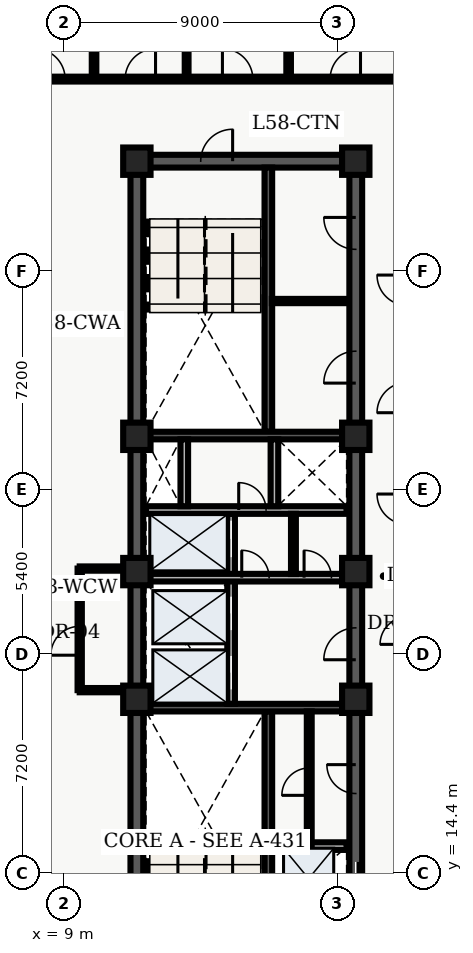
"""IFC4 building model, lengths in metres.
Left out: names, types, materials, properties, quantities, classifications, styles, units other than length and angle.
Written with IfcOpenShell. Run it as: python <this file> out.ifc"""

import sys

from ifc_helpers import new_model, entity, si_unit, converted_unit, direction, frame, origin_with_axes, origin_2d_with_axis, place, context, subcontext, project, spatial, polyline, rectangle, outline, extrude, element, fill, save


model = new_model("IFC4")
c1 = context("Model", 3, precision=1e-05, world=origin_with_axes(), true_north=direction((0.0, 1.0)))
c2 = subcontext(c1, "Body", "Model", "MODEL_VIEW")
j1 = project(units=[si_unit("LENGTHUNIT", "METRE"), converted_unit("PLANEANGLEUNIT", "DEGREE", entity("IfcPlaneAngleMeasure", 0.017), si_unit("PLANEANGLEUNIT", "RADIAN"), dimensions=[0, 0, 0, 0, 0, 0, 0])], contexts=[c1])
p1 = place(None, origin_with_axes())
s1 = spatial("IfcSite", under=j1, at=p1, CompositionType="ELEMENT")
p2 = place(p1, origin_with_axes())
s2 = spatial("IfcBuilding", under=s1, at=p2, CompositionType="ELEMENT")
p3 = place(p2, frame((0.0, 0.0, 236.4), z_axis=(0.0, 0.0, 1.0), x_axis=(1.0, 0.0, 0.0)))
s3 = spatial("IfcBuildingStorey", under=s2, at=p3, CompositionType="ELEMENT", Elevation=236.4)
p4 = place(p3, frame((11.4, 10.8, 0.0), z_axis=(0.0, 0.0, 1.0), x_axis=(0.0, 1.0, 0.0)))
e1 = element("IfcWall", 1, at=p4, inside=s3, PredefinedType="SHEAR", context=c2, shape_type="SweptSolid", body=[
    extrude(outline(polyline([(0.0, -0.21), (27.0, -0.21), (27.0, 0.21), (0.0, 0.21), (0.0, -0.21)])), origin_with_axes(), (0.0, 0.0, 1.0), 3.66),
])
p5 = place(p3, frame((11.4, 37.8, 0.0), z_axis=(0.0, 0.0, 1.0), x_axis=(1.0, 0.0, 0.0)))
e2 = element("IfcWall", 2, at=p5, inside=s3, PredefinedType="SHEAR", context=c2, shape_type="SweptSolid", body=[
    extrude(outline(polyline([(0.0, -0.21), (7.2, -0.21), (7.2, 0.21), (0.0, 0.21), (0.0, -0.21)])), origin_with_axes(), (0.0, 0.0, 1.0), 3.66),
])
p6 = place(p5, frame((2.625, 0.0, 0.0), z_axis=(0.0, 0.0, 1.0), x_axis=(1.0, 0.0, 0.0)))
e3 = element("IfcOpeningElement", 3, at=p6, cuts=e2, PredefinedType="OPENING", context=c2, shape_type="SweptSolid", body=[
    extrude(rectangle(XDim=1.05, YDim=0.44, at=origin_2d_with_axis()), origin_with_axes(), (0.0, 0.0, 1.0), 2.15),
])
p7 = place(p3, frame((18.6, 10.8, 0.0), z_axis=(0.0, 0.0, 1.0), x_axis=(0.0, 1.0, 0.0)))
e4 = element("IfcWall", 4, at=p7, inside=s3, PredefinedType="SHEAR", context=c2, shape_type="SweptSolid", body=[
    extrude(outline(polyline([(0.0, -0.21), (13.5, -0.21), (13.5, 0.21), (0.0, 0.21), (0.0, -0.21)])), origin_with_axes(), (0.0, 0.0, 1.0), 3.66),
])
p8 = place(p7, frame((1.3, 0.0, 0.0), z_axis=(0.0, 0.0, 1.0), x_axis=(1.0, 0.0, 0.0)))
e5 = element("IfcOpeningElement", 5, at=p8, cuts=e4, PredefinedType="OPENING", context=c2, shape_type="SweptSolid", body=[
    extrude(rectangle(XDim=1.1, YDim=0.44, at=origin_2d_with_axis()), origin_with_axes(), (0.0, 0.0, 1.0), 2.15),
])
p9 = place(p7, frame((3.4, 0.0, 0.0), z_axis=(0.0, 0.0, 1.0), x_axis=(1.0, 0.0, 0.0)))
e6 = element("IfcOpeningElement", 6, at=p9, cuts=e4, PredefinedType="OPENING", context=c2, shape_type="SweptSolid", body=[
    extrude(rectangle(XDim=1.1, YDim=0.44, at=origin_2d_with_axis()), origin_with_axes(), (0.0, 0.0, 1.0), 2.15),
])
p10 = place(p7, frame((11.125, 0.0, 0.0), z_axis=(0.0, 0.0, 1.0), x_axis=(1.0, 0.0, 0.0)))
e7 = element("IfcOpeningElement", 7, at=p10, cuts=e4, PredefinedType="OPENING", context=c2, shape_type="SweptSolid", body=[
    extrude(rectangle(XDim=1.05, YDim=0.44, at=origin_2d_with_axis()), origin_with_axes(), (0.0, 0.0, 1.0), 2.15),
])
p11 = place(p7, frame((6.675, 0.0, 0.0), z_axis=(0.0, 0.0, 1.0), x_axis=(1.0, 0.0, 0.0)))
e8 = element("IfcOpeningElement", 8, at=p11, cuts=e4, PredefinedType="OPENING", context=c2, shape_type="SweptSolid", body=[
    extrude(rectangle(XDim=0.95, YDim=0.44, at=origin_2d_with_axis()), origin_with_axes(), (0.0, 0.0, 1.0), 2.15),
])
p12 = place(p3, frame((18.6, 24.3, 0.0), z_axis=(0.0, 0.0, 1.0), x_axis=(0.0, 1.0, 0.0)))
e9 = element("IfcWall", 9, at=p12, inside=s3, PredefinedType="SHEAR", context=c2, shape_type="SweptSolid", body=[
    extrude(outline(polyline([(0.0, -0.21), (13.5, -0.21), (13.5, 0.21), (0.0, 0.21), (0.0, -0.21)])), origin_with_axes(), (0.0, 0.0, 1.0), 3.66),
])
p13 = place(p12, frame((6.725, 0.0, 0.0), z_axis=(0.0, 0.0, 1.0), x_axis=(1.0, 0.0, 0.0)))
e10 = element("IfcOpeningElement", 10, at=p13, cuts=e9, PredefinedType="OPENING", context=c2, shape_type="SweptSolid", body=[
    extrude(rectangle(XDim=1.05, YDim=0.44, at=origin_2d_with_axis()), origin_with_axes(), (0.0, 0.0, 1.0), 2.15),
])
p14 = place(p12, frame((11.125, 0.0, 0.0), z_axis=(0.0, 0.0, 1.0), x_axis=(1.0, 0.0, 0.0)))
e11 = element("IfcOpeningElement", 11, at=p14, cuts=e9, PredefinedType="OPENING", context=c2, shape_type="SweptSolid", body=[
    extrude(rectangle(XDim=1.05, YDim=0.44, at=origin_2d_with_axis()), origin_with_axes(), (0.0, 0.0, 1.0), 2.15),
])
p15 = place(p3, frame((15.725, 11.01, 0.0), z_axis=(0.0, 0.0, 1.0), x_axis=(0.0, 1.0, 0.0)))
e12 = element("IfcWall", 12, at=p15, inside=s3, PredefinedType="SHEAR", context=c2, shape_type="SweptSolid", body=[
    extrude(outline(polyline([(0.0, -0.125), (8.69, -0.125), (8.69, 0.125), (0.0, 0.125), (0.0, -0.125)])), origin_with_axes(), (0.0, 0.0, 1.0), 3.66),
])
p16 = place(p3, frame((11.61, 19.825, 0.0), z_axis=(0.0, 0.0, 1.0), x_axis=(1.0, 0.0, 0.0)))
e13 = element("IfcWall", 13, at=p16, inside=s3, PredefinedType="SHEAR", context=c2, shape_type="SweptSolid", body=[
    extrude(outline(polyline([(0.0, -0.125), (6.78, -0.125), (6.78, 0.125), (0.0, 0.125), (0.0, -0.125)])), origin_with_axes(), (0.0, 0.0, 1.0), 3.66),
])
p17 = place(p3, frame((15.725, 28.9, 0.0), z_axis=(0.0, 0.0, 1.0), x_axis=(0.0, 1.0, 0.0)))
e14 = element("IfcWall", 14, at=p17, inside=s3, PredefinedType="SHEAR", context=c2, shape_type="SweptSolid", body=[
    extrude(outline(polyline([(0.0, -0.125), (8.69, -0.125), (8.69, 0.125), (0.0, 0.125), (0.0, -0.125)])), origin_with_axes(), (0.0, 0.0, 1.0), 3.66),
])
p18 = place(p3, frame((11.61, 28.775, 0.0), z_axis=(0.0, 0.0, 1.0), x_axis=(1.0, 0.0, 0.0)))
e15 = element("IfcWall", 15, at=p18, inside=s3, PredefinedType="SHEAR", context=c2, shape_type="SweptSolid", body=[
    extrude(outline(polyline([(0.0, -0.125), (6.78, -0.125), (6.78, 0.125), (0.0, 0.125), (0.0, -0.125)])), origin_with_axes(), (0.0, 0.0, 1.0), 3.66),
])
p19 = place(p3, frame((14.5, 19.95, 0.0), z_axis=(0.0, 0.0, 1.0), x_axis=(0.0, 1.0, 0.0)))
e16 = element("IfcWall", 16, at=p19, inside=s3, PredefinedType="SOLIDWALL", context=c2, shape_type="SweptSolid", body=[
    extrude(outline(polyline([(0.0, -0.125), (6.25, -0.125), (6.25, 0.125), (0.0, 0.125), (0.0, -0.125)])), origin_with_axes(), (0.0, 0.0, 1.0), 2.7),
])
p20 = place(p19, frame((1.025, 0.0, 0.0), z_axis=(0.0, 0.0, 1.0), x_axis=(1.0, 0.0, 0.0)))
e17 = element("IfcOpeningElement", 17, at=p20, cuts=e16, PredefinedType="OPENING", context=c2, shape_type="SweptSolid", body=[
    extrude(rectangle(XDim=1.1, YDim=0.27, at=origin_2d_with_axis()), origin_with_axes(), (0.0, 0.0, 1.0), 2.15),
])
p21 = place(p19, frame((2.975, 0.0, 0.0), z_axis=(0.0, 0.0, 1.0), x_axis=(1.0, 0.0, 0.0)))
e18 = element("IfcOpeningElement", 18, at=p21, cuts=e16, PredefinedType="OPENING", context=c2, shape_type="SweptSolid", body=[
    extrude(rectangle(XDim=1.1, YDim=0.27, at=origin_2d_with_axis()), origin_with_axes(), (0.0, 0.0, 1.0), 2.15),
])
p22 = place(p19, frame((5.425, 0.0, 0.0), z_axis=(0.0, 0.0, 1.0), x_axis=(1.0, 0.0, 0.0)))
e19 = element("IfcOpeningElement", 19, at=p22, cuts=e16, PredefinedType="OPENING", context=c2, shape_type="SweptSolid", body=[
    extrude(rectangle(XDim=1.2, YDim=0.27, at=origin_2d_with_axis()), origin_with_axes(), (0.0, 0.0, 1.0), 2.15),
])
p23 = place(p3, frame((11.7, 24.1, 0.0), z_axis=(0.0, 0.0, 1.0), x_axis=(1.0, 0.0, 0.0)))
e20 = element("IfcWall", 20, at=p23, inside=s3, PredefinedType="SOLIDWALL", context=c2, shape_type="SweptSolid", body=[
    extrude(outline(polyline([(0.0, -0.125), (6.6, -0.125), (6.6, 0.125), (0.0, 0.125), (0.0, -0.125)])), origin_with_axes(), (0.0, 0.0, 1.0), 2.7),
])
p24 = place(p23, frame((3.6, 0.0, 0.0), z_axis=(0.0, 0.0, 1.0), x_axis=(1.0, 0.0, 0.0)))
e21 = element("IfcOpeningElement", 21, at=p24, cuts=e20, PredefinedType="OPENING", context=c2, shape_type="SweptSolid", body=[
    extrude(rectangle(XDim=0.9, YDim=0.27, at=origin_2d_with_axis()), origin_with_axes(), (0.0, 0.0, 1.0), 2.15),
])
p25 = place(p23, frame((5.65, 0.0, 0.0), z_axis=(0.0, 0.0, 1.0), x_axis=(1.0, 0.0, 0.0)))
e22 = element("IfcOpeningElement", 22, at=p25, cuts=e20, PredefinedType="OPENING", context=c2, shape_type="SweptSolid", body=[
    extrude(rectangle(XDim=0.9, YDim=0.27, at=origin_2d_with_axis()), origin_with_axes(), (0.0, 0.0, 1.0), 2.15),
])
p26 = place(p3, frame((11.7, 26.325, 0.0), z_axis=(0.0, 0.0, 1.0), x_axis=(1.0, 0.0, 0.0)))
e23 = element("IfcWall", 23, at=p26, inside=s3, PredefinedType="SOLIDWALL", context=c2, shape_type="SweptSolid", body=[
    extrude(outline(polyline([(0.0, -0.125), (6.6, -0.125), (6.6, 0.125), (0.0, 0.125), (0.0, -0.125)])), origin_with_axes(), (0.0, 0.0, 1.0), 2.7),
])
p27 = place(p26, frame((3.5, 0.0, 0.0), z_axis=(0.0, 0.0, 1.0), x_axis=(1.0, 0.0, 0.0)))
e24 = element("IfcOpeningElement", 24, at=p27, cuts=e23, PredefinedType="OPENING", context=c2, shape_type="SweptSolid", body=[
    extrude(rectangle(XDim=0.9, YDim=0.27, at=origin_2d_with_axis()), origin_with_axes(), (0.0, 0.0, 1.0), 2.15),
])
for number, where, z_axis, x_axis in (
    (25, (12.96, 26.45, 0.0), (0.0, 0.0, 1.0), (0.0, 1.0, 0.0)),
    (26, (15.925, 26.45, 0.0), (0.0, 0.0, 1.0), (0.0, 1.0, 0.0)),
):
    element("IfcWall", number, at=place(p3, frame(where, z_axis=z_axis, x_axis=x_axis)), inside=s3, PredefinedType="SOLIDWALL", context=c2, shape_type="SweptSolid", body=[
        extrude(outline(polyline([(0.0, -0.125), (2.2, -0.125), (2.2, 0.125), (0.0, 0.125), (0.0, -0.125)])), origin_with_axes(), (0.0, 0.0, 1.0), 2.7),
    ])
for number, where, z_axis, x_axis in (
    (27, (11.4, 20.1, 0.0), (0.0, 0.0, 1.0), (1.0, 0.0, 0.0)),
    (28, (11.4, 24.3, 0.0), (0.0, 0.0, 1.0), (1.0, 0.0, 0.0)),
    (29, (11.4, 28.75, 0.0), (0.0, 0.0, 1.0), (1.0, 0.0, 0.0)),
    (30, (11.4, 37.8, 0.0), (0.0, 0.0, 1.0), (1.0, 0.0, 0.0)),
    (31, (18.6, 20.1, 0.0), (0.0, 0.0, 1.0), (1.0, 0.0, 0.0)),
    (32, (18.6, 24.3, 0.0), (0.0, 0.0, 1.0), (1.0, 0.0, 0.0)),
    (33, (18.6, 28.75, 0.0), (0.0, 0.0, 1.0), (1.0, 0.0, 0.0)),
    (34, (18.6, 37.8, 0.0), (0.0, 0.0, 1.0), (1.0, 0.0, 0.0)),
):
    element("IfcColumn", number, at=place(p3, frame(where, z_axis=z_axis, x_axis=x_axis)), inside=s3, PredefinedType="COLUMN", context=c2, shape_type="SweptSolid", body=[
        extrude(rectangle(XDim=0.9, YDim=0.9, at=origin_2d_with_axis()), origin_with_axes(), (0.0, 0.0, 1.0), 3.9),
    ])
p28 = place(p3, frame((16.55, 24.22, 0.0), z_axis=(0.0, 0.0, 1.0), x_axis=(0.0, 1.0, 0.0)))
e35 = element("IfcWall", 35, at=p28, inside=s3, PredefinedType="PARTITIONING", context=c2, shape_type="SweptSolid", body=[
    extrude(outline(polyline([(0.0, -0.08), (1.98, -0.08), (1.98, 0.08), (0.0, 0.08), (0.0, -0.08)])), origin_with_axes(), (0.0, 0.0, 1.0), 2.7),
])
p29 = place(p3, frame((15.84, 15.27, 0.0), z_axis=(0.0, 0.0, 1.0), x_axis=(1.0, 0.0, 0.0)))
e36 = element("IfcWall", 36, at=p29, inside=s3, PredefinedType="SOLIDWALL", context=c2, shape_type="SweptSolid", body=[
    extrude(outline(polyline([(0.0, -0.125), (2.46, -0.125), (2.46, 0.125), (0.0, 0.125), (0.0, -0.125)])), origin_with_axes(), (0.0, 0.0, 1.0), 2.7),
])
p30 = place(p3, frame((17.07, 15.34, 0.0), z_axis=(0.0, 0.0, 1.0), x_axis=(0.0, 1.0, 0.0)))
e37 = element("IfcWall", 37, at=p30, inside=s3, PredefinedType="PARTITIONING", context=c2, shape_type="SweptSolid", body=[
    extrude(outline(polyline([(0.0, -0.08), (4.36, -0.08), (4.36, 0.08), (0.0, 0.08), (0.0, -0.08)])), origin_with_axes(), (0.0, 0.0, 1.0), 2.7),
])
p31 = place(p30, frame((2.05, 0.0, 0.0), z_axis=(0.0, 0.0, 1.0), x_axis=(1.0, 0.0, 0.0)))
e38 = element("IfcOpeningElement", 38, at=p31, cuts=e37, PredefinedType="OPENING", context=c2, shape_type="SweptSolid", body=[
    extrude(rectangle(XDim=0.9, YDim=0.18, at=origin_2d_with_axis()), origin_with_axes(), (0.0, 0.0, 1.0), 2.15),
])
p32 = place(p3, frame((15.84, 33.2, 0.0), z_axis=(0.0, 0.0, 1.0), x_axis=(1.0, 0.0, 0.0)))
e39 = element("IfcWall", 39, at=p32, inside=s3, PredefinedType="PARTITIONING", context=c2, shape_type="SweptSolid", body=[
    extrude(outline(polyline([(0.0, -0.07), (2.46, -0.07), (2.46, 0.07), (0.0, 0.07), (0.0, -0.07)])), origin_with_axes(), (0.0, 0.0, 1.0), 2.7),
])
p33 = place(p3, frame((9.52, 20.4, 0.0), z_axis=(0.0, 0.0, 1.0), x_axis=(0.0, 1.0, 0.0)))
e40 = element("IfcWall", 40, at=p33, inside=s3, PredefinedType="PARTITIONING", context=c2, shape_type="SweptSolid", body=[
    extrude(outline(polyline([(0.0, -0.07), (4.0, -0.07), (4.0, 0.07), (0.0, 0.07), (0.0, -0.07)])), origin_with_axes(), (0.0, 0.0, 1.0), 2.7),
])
p34 = place(p33, frame((1.625, 0.0, 0.0), z_axis=(0.0, 0.0, 1.0), x_axis=(1.0, 0.0, 0.0)))
e41 = element("IfcOpeningElement", 41, at=p34, cuts=e40, PredefinedType="OPENING", context=c2, shape_type="SweptSolid", body=[
    extrude(rectangle(XDim=0.95, YDim=0.16, at=origin_2d_with_axis()), origin_with_axes(), (0.0, 0.0, 1.0), 2.15),
])
for number, where, z_axis, x_axis in (
    (42, (9.52, 20.4, 0.0), (0.0, 0.0, 1.0), (1.0, 0.0, 0.0)),
    (43, (9.52, 24.4, 0.0), (0.0, 0.0, 1.0), (1.0, 0.0, 0.0)),
):
    element("IfcWall", number, at=place(p3, frame(where, z_axis=z_axis, x_axis=x_axis)), inside=s3, PredefinedType="PARTITIONING", context=c2, shape_type="SweptSolid", body=[
        extrude(outline(polyline([(0.0, -0.07), (1.58, -0.07), (1.58, 0.07), (0.0, 0.07), (0.0, -0.07)])), origin_with_axes(), (0.0, 0.0, 1.0), 2.7),
    ])
p35 = place(p3, frame((7.1, 40.5, 0.0), z_axis=(0.0, 0.0, 1.0), x_axis=(1.0, 0.0, 0.0)))
e44 = element("IfcWall", 44, at=p35, inside=s3, PredefinedType="PARTITIONING", context=c2, shape_type="SweptSolid", body=[
    extrude(outline(polyline([(0.0, -0.08), (24.965, -0.08), (24.965, 0.08), (0.0, 0.08), (0.0, -0.08)])), origin_with_axes(), (0.0, 0.0, 1.0), 2.7),
])
p36 = place(p35, frame((1.441, 0.0, 0.0), z_axis=(0.0, 0.0, 1.0), x_axis=(1.0, 0.0, 0.0)))
e45 = element("IfcOpeningElement", 45, at=p36, cuts=e44, PredefinedType="OPENING", context=c2, shape_type="SweptSolid", body=[
    extrude(rectangle(XDim=1.0, YDim=0.18, at=origin_2d_with_axis()), origin_with_axes(), (0.0, 0.0, 1.0), 2.15),
])
p37 = place(p35, frame((4.415, 0.0, 0.0), z_axis=(0.0, 0.0, 1.0), x_axis=(1.0, 0.0, 0.0)))
e46 = element("IfcOpeningElement", 46, at=p37, cuts=e44, PredefinedType="OPENING", context=c2, shape_type="SweptSolid", body=[
    extrude(rectangle(XDim=1.0, YDim=0.18, at=origin_2d_with_axis()), origin_with_axes(), (0.0, 0.0, 1.0), 2.15),
])
p38 = place(p35, frame((7.614, 0.0, 0.0), z_axis=(0.0, 0.0, 1.0), x_axis=(1.0, 0.0, 0.0)))
e47 = element("IfcOpeningElement", 47, at=p38, cuts=e44, PredefinedType="OPENING", context=c2, shape_type="SweptSolid", body=[
    extrude(rectangle(XDim=1.0, YDim=0.18, at=origin_2d_with_axis()), origin_with_axes(), (0.0, 0.0, 1.0), 2.15),
])
p39 = place(p35, frame((11.156, 0.0, 0.0), z_axis=(0.0, 0.0, 1.0), x_axis=(1.0, 0.0, 0.0)))
e48 = element("IfcOpeningElement", 48, at=p39, cuts=e44, PredefinedType="OPENING", context=c2, shape_type="SweptSolid", body=[
    extrude(rectangle(XDim=1.0, YDim=0.18, at=origin_2d_with_axis()), origin_with_axes(), (0.0, 0.0, 1.0), 2.15),
])
p40 = place(p3, frame((9.992, 40.6, 0.0), z_axis=(0.0, 0.0, 1.0), x_axis=(0.0, 1.0, 0.0)))
e49 = element("IfcWall", 49, at=p40, inside=s3, PredefinedType="PARTITIONING", context=c2, shape_type="SweptSolid", body=[
    extrude(outline(polyline([(0.0, -0.075), (7.665, -0.075), (7.665, 0.075), (0.0, 0.075), (0.0, -0.075)])), origin_with_axes(), (0.0, 0.0, 1.0), 2.7),
])
p41 = place(p3, frame((13.037, 40.6, 0.0), z_axis=(0.0, 0.0, 1.0), x_axis=(0.0, 1.0, 0.0)))
e50 = element("IfcWall", 50, at=p41, inside=s3, PredefinedType="PARTITIONING", context=c2, shape_type="SweptSolid", body=[
    extrude(outline(polyline([(0.0, -0.062), (7.665, -0.062), (7.665, 0.062), (0.0, 0.062), (0.0, -0.062)])), origin_with_axes(), (0.0, 0.0, 1.0), 2.7),
])
p42 = place(p3, frame((16.392, 40.6, 0.0), z_axis=(0.0, 0.0, 1.0), x_axis=(0.0, 1.0, 0.0)))
e51 = element("IfcWall", 51, at=p42, inside=s3, PredefinedType="PARTITIONING", context=c2, shape_type="SweptSolid", body=[
    extrude(outline(polyline([(0.0, -0.075), (7.665, -0.075), (7.665, 0.075), (0.0, 0.075), (0.0, -0.075)])), origin_with_axes(), (0.0, 0.0, 1.0), 2.7),
])
p43 = place(p7, frame((3.4, 0.0, 0.0), z_axis=(0.0, 0.0, 1.0), x_axis=(1.0, 0.0, 0.0)))
e52 = element("IfcDoor", 52, at=p43, inside=s3, OperationType="SLIDING_TO_RIGHT", PredefinedType="DOOR", context=c2, shape_type="SweptSolid", body=[
    extrude(rectangle(XDim=1.1, YDim=0.09, at=origin_2d_with_axis()), origin_with_axes(), (0.0, 0.0, 1.0), 2.15),
])
fill(e6, e52)
p44 = place(p19, frame((1.025, 0.0, 0.0), z_axis=(0.0, 0.0, 1.0), x_axis=(1.0, 0.0, 0.0)))
e53 = element("IfcDoor", 53, at=p44, inside=s3, OperationType="SLIDING_TO_LEFT", PredefinedType="DOOR", context=c2, shape_type="SweptSolid", body=[
    extrude(rectangle(XDim=1.1, YDim=0.09, at=origin_2d_with_axis()), origin_with_axes(), (0.0, 0.0, 1.0), 2.15),
])
fill(e17, e53)
p45 = place(p19, frame((2.975, 0.0, 0.0), z_axis=(0.0, 0.0, 1.0), x_axis=(1.0, 0.0, 0.0)))
e54 = element("IfcDoor", 54, at=p45, inside=s3, OperationType="SLIDING_TO_RIGHT", PredefinedType="DOOR", context=c2, shape_type="SweptSolid", body=[
    extrude(rectangle(XDim=1.1, YDim=0.09, at=origin_2d_with_axis()), origin_with_axes(), (0.0, 0.0, 1.0), 2.15),
])
fill(e18, e54)
p46 = place(p19, frame((5.425, 0.0, 0.0), z_axis=(0.0, 0.0, 1.0), x_axis=(1.0, 0.0, 0.0)))
e55 = element("IfcDoor", 55, at=p46, inside=s3, OperationType="DOUBLE_DOOR_SLIDING", PredefinedType="DOOR", context=c2, shape_type="SweptSolid", body=[
    extrude(rectangle(XDim=1.2, YDim=0.09, at=origin_2d_with_axis()), origin_with_axes(), (0.0, 0.0, 1.0), 2.15),
])
fill(e19, e55)
p47 = place(p5, frame((2.625, 0.0, 0.0), z_axis=(0.0, 0.0, 1.0), x_axis=(1.0, 0.0, 0.0)))
e56 = element("IfcDoor", 56, at=p47, inside=s3, OperationType="SINGLE_SWING_RIGHT", PredefinedType="DOOR", context=c2, shape_type="SweptSolid", body=[
    extrude(rectangle(XDim=1.05, YDim=0.09, at=origin_2d_with_axis()), origin_with_axes(), (0.0, 0.0, 1.0), 2.15),
])
fill(e3, e56)
p48 = place(p7, frame((11.125, 0.0, 0.0), z_axis=(0.0, 0.0, 1.0), x_axis=(1.0, 0.0, 0.0)))
e57 = element("IfcDoor", 57, at=p48, inside=s3, OperationType="SINGLE_SWING_LEFT", PredefinedType="DOOR", context=c2, shape_type="SweptSolid", body=[
    extrude(rectangle(XDim=1.05, YDim=0.09, at=origin_2d_with_axis()), origin_with_axes(), (0.0, 0.0, 1.0), 2.15),
])
fill(e7, e57)
p49 = place(p23, frame((3.6, 0.0, 0.0), z_axis=(0.0, 0.0, 1.0), x_axis=(1.0, 0.0, 0.0)))
e58 = element("IfcDoor", 58, at=p49, inside=s3, OperationType="SINGLE_SWING_LEFT", PredefinedType="DOOR", context=c2, shape_type="SweptSolid", body=[
    extrude(rectangle(XDim=0.9, YDim=0.09, at=origin_2d_with_axis()), origin_with_axes(), (0.0, 0.0, 1.0), 2.15),
])
fill(e21, e58)
p50 = place(p23, frame((5.65, 0.0, 0.0), z_axis=(0.0, 0.0, 1.0), x_axis=(1.0, 0.0, 0.0)))
e59 = element("IfcDoor", 59, at=p50, inside=s3, OperationType="SINGLE_SWING_LEFT", PredefinedType="DOOR", context=c2, shape_type="SweptSolid", body=[
    extrude(rectangle(XDim=0.9, YDim=0.09, at=origin_2d_with_axis()), origin_with_axes(), (0.0, 0.0, 1.0), 2.15),
])
fill(e22, e59)
p51 = place(p26, frame((3.5, 0.0, 0.0), z_axis=(0.0, 0.0, 1.0), x_axis=(1.0, 0.0, 0.0)))
e60 = element("IfcDoor", 60, at=p51, inside=s3, OperationType="SINGLE_SWING_LEFT", PredefinedType="DOOR", context=c2, shape_type="SweptSolid", body=[
    extrude(rectangle(XDim=0.9, YDim=0.09, at=origin_2d_with_axis()), origin_with_axes(), (0.0, 0.0, 1.0), 2.15),
])
fill(e24, e60)
p52 = place(p30, frame((2.05, 0.0, 0.0), z_axis=(0.0, 0.0, 1.0), x_axis=(1.0, 0.0, 0.0)))
e61 = element("IfcDoor", 61, at=p52, inside=s3, OperationType="SINGLE_SWING_LEFT", PredefinedType="DOOR", context=c2, shape_type="SweptSolid", body=[
    extrude(rectangle(XDim=0.9, YDim=0.09, at=origin_2d_with_axis()), origin_with_axes(), (0.0, 0.0, 1.0), 2.15),
])
fill(e38, e61)
p53 = place(p7, frame((6.675, 0.0, 0.0), z_axis=(0.0, 0.0, 1.0), x_axis=(1.0, 0.0, 0.0)))
e62 = element("IfcDoor", 62, at=p53, inside=s3, OperationType="SINGLE_SWING_RIGHT", PredefinedType="DOOR", context=c2, shape_type="SweptSolid", body=[
    extrude(rectangle(XDim=0.95, YDim=0.09, at=origin_2d_with_axis()), origin_with_axes(), (0.0, 0.0, 1.0), 2.15),
])
fill(e8, e62)
p54 = place(p12, frame((6.725, 0.0, 0.0), z_axis=(0.0, 0.0, 1.0), x_axis=(1.0, 0.0, 0.0)))
e63 = element("IfcDoor", 63, at=p54, inside=s3, OperationType="SINGLE_SWING_LEFT", PredefinedType="DOOR", context=c2, shape_type="SweptSolid", body=[
    extrude(rectangle(XDim=1.05, YDim=0.09, at=origin_2d_with_axis()), origin_with_axes(), (0.0, 0.0, 1.0), 2.15),
])
fill(e10, e63)
p55 = place(p12, frame((11.125, 0.0, 0.0), z_axis=(0.0, 0.0, 1.0), x_axis=(1.0, 0.0, 0.0)))
e64 = element("IfcDoor", 64, at=p55, inside=s3, OperationType="SINGLE_SWING_RIGHT", PredefinedType="DOOR", context=c2, shape_type="SweptSolid", body=[
    extrude(rectangle(XDim=1.05, YDim=0.09, at=origin_2d_with_axis()), origin_with_axes(), (0.0, 0.0, 1.0), 2.15),
])
fill(e11, e64)
p56 = place(p33, frame((1.625, 0.0, 0.0), z_axis=(0.0, 0.0, 1.0), x_axis=(1.0, 0.0, 0.0)))
e65 = element("IfcDoor", 65, at=p56, inside=s3, OperationType="SINGLE_SWING_LEFT", PredefinedType="DOOR", context=c2, shape_type="SweptSolid", body=[
    extrude(rectangle(XDim=0.95, YDim=0.084, at=origin_2d_with_axis()), origin_with_axes(), (0.0, 0.0, 1.0), 2.15),
])
fill(e41, e65)
p57 = place(p35, frame((1.441, 0.0, 0.0), z_axis=(0.0, 0.0, 1.0), x_axis=(1.0, 0.0, 0.0)))
e66 = element("IfcDoor", 66, at=p57, inside=s3, OperationType="SINGLE_SWING_LEFT", PredefinedType="DOOR", context=c2, shape_type="SweptSolid", body=[
    extrude(rectangle(XDim=1.0, YDim=0.09, at=origin_2d_with_axis()), origin_with_axes(), (0.0, 0.0, 1.0), 2.15),
])
fill(e45, e66)
p58 = place(p35, frame((4.415, 0.0, 0.0), z_axis=(0.0, 0.0, 1.0), x_axis=(1.0, 0.0, 0.0)))
e67 = element("IfcDoor", 67, at=p58, inside=s3, OperationType="SINGLE_SWING_RIGHT", PredefinedType="DOOR", context=c2, shape_type="SweptSolid", body=[
    extrude(rectangle(XDim=1.0, YDim=0.09, at=origin_2d_with_axis()), origin_with_axes(), (0.0, 0.0, 1.0), 2.15),
])
fill(e46, e67)
p59 = place(p35, frame((7.614, 0.0, 0.0), z_axis=(0.0, 0.0, 1.0), x_axis=(1.0, 0.0, 0.0)))
e68 = element("IfcDoor", 68, at=p59, inside=s3, OperationType="SINGLE_SWING_LEFT", PredefinedType="DOOR", context=c2, shape_type="SweptSolid", body=[
    extrude(rectangle(XDim=1.0, YDim=0.09, at=origin_2d_with_axis()), origin_with_axes(), (0.0, 0.0, 1.0), 2.15),
])
fill(e47, e68)
p60 = place(p35, frame((11.156, 0.0, 0.0), z_axis=(0.0, 0.0, 1.0), x_axis=(1.0, 0.0, 0.0)))
e69 = element("IfcDoor", 69, at=p60, inside=s3, OperationType="SINGLE_SWING_RIGHT", PredefinedType="DOOR", context=c2, shape_type="SweptSolid", body=[
    extrude(rectangle(XDim=1.0, YDim=0.09, at=origin_2d_with_axis()), origin_with_axes(), (0.0, 0.0, 1.0), 2.15),
])
fill(e48, e69)
save(model, sys.argv[1])
